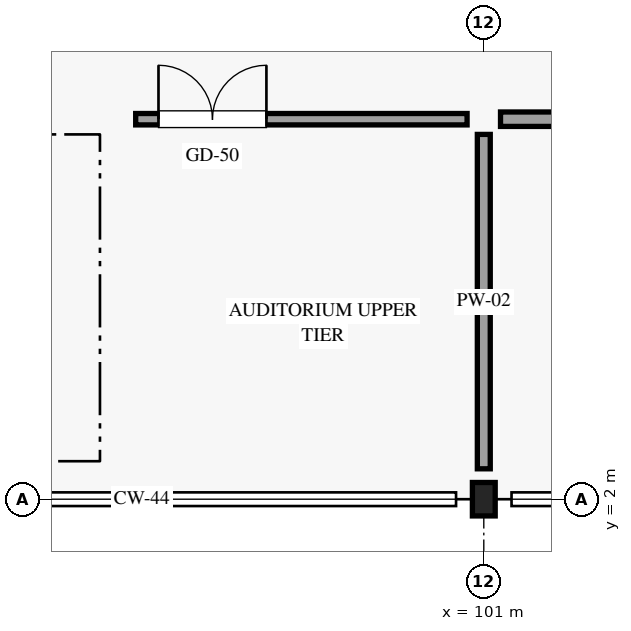
"""IFC4 building model, lengths in metres.
Left out: names, types, materials, properties, quantities, classifications, styles, units other than length and angle.
Written with IfcOpenShell. Run it as: python <this file> out.ifc"""

import sys

from ifc_helpers import new_model, si_unit, direction, frame, frame_2d, origin, origin_2d, place, context, subcontext, project, spatial, rectangle, i_section, extrude, element, fill, save


model = new_model("IFC4")
c1 = context("Model", 3, precision=1e-05, world=origin(), true_north=direction((0.0, 1.0)))
c2 = subcontext(c1, "Body", "Model", "MODEL_VIEW")
j1 = project(units=[si_unit("LENGTHUNIT", "METRE"), si_unit("PLANEANGLEUNIT", "RADIAN")], contexts=[c1])
p1 = place(None, origin())
s1 = spatial("IfcSite", under=j1, at=p1, CompositionType="ELEMENT")
p2 = place(p1, origin())
s2 = spatial("IfcBuilding", under=s1, at=p2, CompositionType="ELEMENT")
p3 = place(p2, frame((0.0, 0.0, 5.4)))
s3 = spatial("IfcBuildingStorey", under=s2, at=p3, CompositionType="ELEMENT", Elevation=5.4)
p4 = place(p3, frame((101.0, 2.0, 0.0), z_axis=(0.0, 0.0, 1.0), x_axis=(1.0, 0.0, 0.0)))
e1 = element("IfcColumn", 1, at=p4, inside=s3, PredefinedType="COLUMN", context=c2, shape_type="SweptSolid", body=[
    extrude(i_section(OverallWidth=0.3, OverallDepth=0.44, WebThickness=0.011, FlangeThickness=0.021, FilletRadius=0.027, at=origin_2d()), origin(), (0.0, 0.0, 1.0), 4.8),
])
p5 = place(p3, frame((96.42, 7.0, 0.0), z_axis=(0.0, 0.0, 1.0), x_axis=(1.0, 0.0, 0.0)))
e2 = element("IfcWall", 2, at=p5, inside=s3, PredefinedType="PARTITIONING", context=c2, shape_type="SweptSolid", body=[
    extrude(rectangle(XDim=4.36, YDim=0.15, at=frame_2d((2.18, 0.0))), origin(), (0.0, 0.0, 1.0), 4.035),
])
p6 = place(p5, frame((0.3, 0.0, 0.0)))
e3 = element("IfcOpeningElement", 3, at=p6, cuts=e2, PredefinedType="OPENING", context=c2, shape_type="SweptSolid", body=[
    extrude(rectangle(XDim=1.42, YDim=2.3, at=frame_2d((0.71, 1.15))), frame((0.0, 0.085, 0.0), z_axis=(0.0, -1.0, 0.0), x_axis=(1.0, 0.0, 0.0)), (0.0, 0.0, 1.0), 0.17),
])
p7 = place(p3, frame((101.0, 2.4, 0.0), z_axis=(0.0, 0.0, 1.0), x_axis=(0.0, 1.0, 0.0)))
e4 = element("IfcWall", 4, at=p7, inside=s3, PredefinedType="PARTITIONING", context=c2, shape_type="SweptSolid", body=[
    extrude(rectangle(XDim=4.4, YDim=0.17, at=frame_2d((2.2, 0.0))), origin(), (0.0, 0.0, 1.0), 4.035),
])
p8 = place(p3, frame((101.22, 7.0, 0.0), z_axis=(0.0, 0.0, 1.0), x_axis=(1.0, 0.0, 0.0)))
e5 = element("IfcWall", 5, at=p8, inside=s3, PredefinedType="PARTITIONING", context=c2, shape_type="SweptSolid", body=[
    extrude(rectangle(XDim=17.24, YDim=0.19, at=frame_2d((8.62, 0.0))), origin(), (0.0, 0.0, 1.0), 4.035),
])
p9 = place(p8, frame((12.732, 0.0, 0.0)))
e6 = element("IfcOpeningElement", 6, at=p9, cuts=e5, PredefinedType="OPENING", context=c2, shape_type="SweptSolid", body=[
    extrude(rectangle(XDim=0.98, YDim=2.18, at=frame_2d((0.49, 1.09))), frame((0.0, 0.105, 0.0), z_axis=(0.0, -1.0, 0.0), x_axis=(1.0, 0.0, 0.0)), (0.0, 0.0, 1.0), 0.21),
])
p10 = place(p6, origin())
e7 = element("IfcDoor", 7, at=p10, inside=s3, OperationType="DOUBLE_DOOR_SINGLE_SWING", PredefinedType="DOOR", context=c2, shape_type="SweptSolid", body=[
    extrude(rectangle(XDim=1.42, YDim=2.3, at=frame_2d((0.71, 1.15))), frame((0.0, 0.025, 0.0), z_axis=(0.0, -1.0, 0.0), x_axis=(1.0, 0.0, 0.0)), (0.0, 0.0, 1.0), 0.05),
])
fill(e3, e7)
save(model, sys.argv[1])
